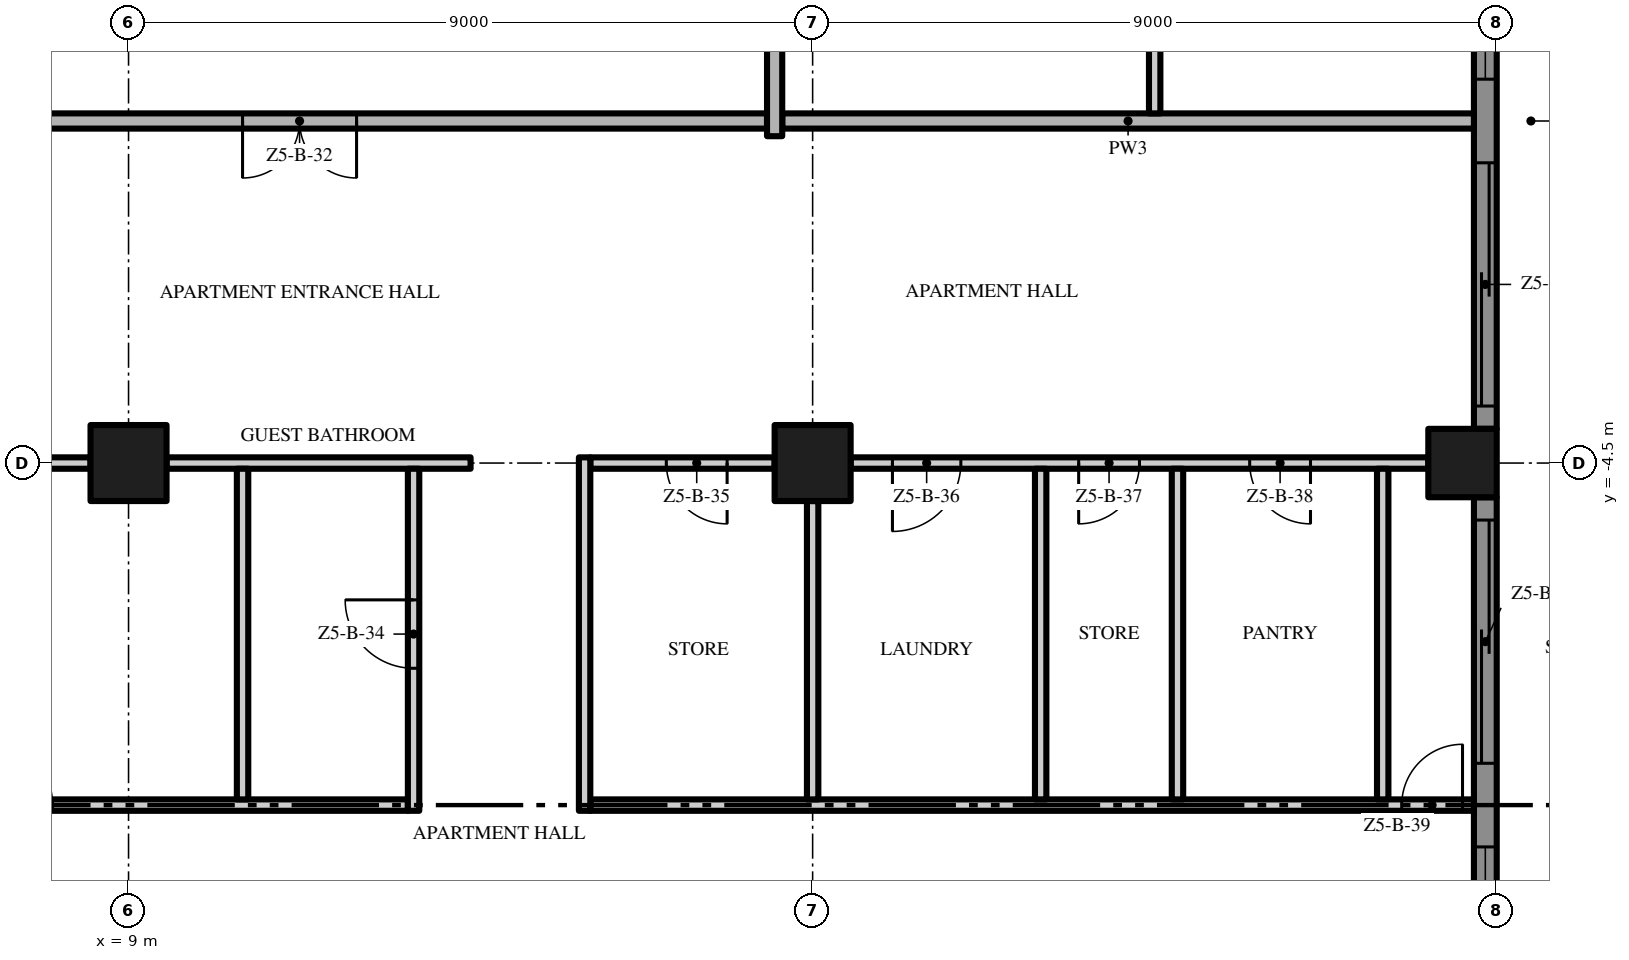
"""IFC4 building model, lengths in metres.
Left out: names, types, materials, properties, quantities, classifications, styles, units other than length and angle.
Written with IfcOpenShell. Run it as: python <this file> out.ifc"""

import sys

from ifc_helpers import new_model, si_unit, direction, frame, frame_2d, origin, origin_2d, place, context, subcontext, project, spatial, polyline, rectangle, outline, extrude, element, fill, save


model = new_model("IFC4")
c1 = context("Model", 3, precision=1e-05, world=origin(), true_north=direction((0.0, 1.0)))
c2 = subcontext(c1, "Body", "Model", "MODEL_VIEW")
j1 = project(units=[si_unit("LENGTHUNIT", "METRE"), si_unit("PLANEANGLEUNIT", "RADIAN")], contexts=[c1])
p1 = place(None, origin())
s1 = spatial("IfcSite", under=j1, at=p1, CompositionType="ELEMENT")
p2 = place(p1, origin())
s2 = spatial("IfcBuilding", under=s1, at=p2, CompositionType="ELEMENT")
p3 = place(p2, frame((0.0, 0.0, 254.0)))
s3 = spatial("IfcBuildingStorey", under=s2, at=p3, CompositionType="ELEMENT", Elevation=254.0)
p4 = place(p3, frame((18.0, -4.5, 0.0), z_axis=(0.0, 0.0, 1.0), x_axis=(1.0, 0.0, 0.0)))
e1 = element("IfcColumn", 1, at=p4, inside=s3, PredefinedType="COLUMN", context=c2, shape_type="SweptSolid", body=[
    extrude(rectangle(XDim=1.0, YDim=1.0, at=origin_2d()), origin(), (0.0, 0.0, 1.0), 3.5),
])
p5 = place(p3, frame((26.55, -4.5, 0.0), z_axis=(0.0, 0.0, 1.0), x_axis=(1.0, 0.0, 0.0)))
e2 = element("IfcColumn", 2, at=p5, inside=s3, PredefinedType="COLUMN", context=c2, shape_type="SweptSolid", body=[
    extrude(rectangle(XDim=0.9, YDim=0.9, at=origin_2d()), origin(), (0.0, 0.0, 1.0), 3.5),
])
p6 = place(p3, frame((9.0, -4.5, 0.0), z_axis=(0.0, 0.0, 1.0), x_axis=(1.0, 0.0, 0.0)))
e3 = element("IfcColumn", 3, at=p6, inside=s3, PredefinedType="COLUMN", context=c2, shape_type="SweptSolid", body=[
    extrude(rectangle(XDim=1.0, YDim=1.0, at=origin_2d()), origin(), (0.0, 0.0, 1.0), 3.5),
])
p7 = place(p3, frame((26.85, -4.95, 0.0), z_axis=(0.0, 0.0, 1.0), x_axis=(0.0, -1.0, 0.0)))
e4 = element("IfcWall", 4, at=p7, inside=s3, PredefinedType="SOLIDWALL", context=c2, shape_type="SweptSolid", body=[
    extrude(rectangle(XDim=8.1, YDim=0.3, at=frame_2d((4.05, 0.0))), origin(), (0.0, 0.0, 1.0), 3.5),
])
p8 = place(p7, frame((4.6, 0.0, 0.45)))
e5 = element("IfcOpeningElement", 5, at=p8, cuts=e4, PredefinedType="OPENING", context=c2, shape_type="SweptSolid", body=[
    extrude(rectangle(XDim=3.2, YDim=2.65, at=frame_2d((1.6, 1.325))), frame((0.0, 0.16, 0.0), z_axis=(0.0, -1.0, 0.0), x_axis=(1.0, 0.0, 0.0)), (0.0, 0.0, 1.0), 0.32),
])
p9 = place(p7, frame((0.3, 0.0, 0.0)))
e6 = element("IfcOpeningElement", 6, at=p9, cuts=e4, PredefinedType="OPENING", context=c2, shape_type="SweptSolid", body=[
    extrude(rectangle(XDim=3.2, YDim=2.4, at=frame_2d((1.6, 1.2))), frame((0.0, 0.16, 0.0), z_axis=(0.0, -1.0, 0.0), x_axis=(1.0, 0.0, 0.0)), (0.0, 0.0, 1.0), 0.32),
])
p10 = place(p3, frame((26.85, 4.05, 0.0), z_axis=(0.0, 0.0, 1.0), x_axis=(0.0, -1.0, 0.0)))
e7 = element("IfcWall", 7, at=p10, inside=s3, PredefinedType="SOLIDWALL", context=c2, shape_type="SweptSolid", body=[
    extrude(rectangle(XDim=8.1, YDim=0.3, at=frame_2d((4.05, 0.0))), origin(), (0.0, 0.0, 1.0), 3.5),
])
p11 = place(p10, frame((4.6, 0.0, 0.0)))
e8 = element("IfcOpeningElement", 8, at=p11, cuts=e7, PredefinedType="OPENING", context=c2, shape_type="SweptSolid", body=[
    extrude(rectangle(XDim=3.2, YDim=2.4, at=frame_2d((1.6, 1.2))), frame((0.0, 0.16, 0.0), z_axis=(0.0, -1.0, 0.0), x_axis=(1.0, 0.0, 0.0)), (0.0, 0.0, 1.0), 0.32),
])
p12 = place(p10, frame((0.3, 0.0, 0.45)))
e9 = element("IfcOpeningElement", 9, at=p12, cuts=e7, PredefinedType="OPENING", context=c2, shape_type="SweptSolid", body=[
    extrude(rectangle(XDim=3.2, YDim=2.65, at=frame_2d((1.6, 1.325))), frame((0.0, 0.16, 0.0), z_axis=(0.0, -1.0, 0.0), x_axis=(1.0, 0.0, 0.0)), (0.0, 0.0, 1.0), 0.32),
])
p13 = place(p3, origin())
e10 = element("IfcWall", 10, at=p13, inside=s3, PredefinedType="USERDEFINED", context=c2, shape_type="SweptSolid", body=[
    extrude(outline(polyline([(29.649, -18.0), (28.988, -16.5), (28.255, -15.0), (27.731, -13.5), (27.6, -12.375), (27.615, -12.0), (27.951, -10.5), (28.612, -9.0), (29.345, -7.5), (29.869, -6.0), (30.0, -4.875), (29.985, -4.5), (29.649, -3.0), (28.988, -1.5), (28.255, 0.0), (27.731, 1.5), (27.6, 2.625), (27.615, 3.0), (27.951, 4.5), (28.612, 6.0), (29.345, 7.5), (29.869, 9.0), (30.0, 10.125), (29.985, 10.5), (29.649, 12.0), (28.988, 13.5), (28.255, 15.0), (27.731, 16.5), (27.6, 17.625), (27.615, 18.0), (27.365, 18.01), (27.349, 17.615), (27.486, 16.444), (28.024, 14.904), (28.761, 13.395), (29.41, 11.921), (29.736, 10.467), (29.749, 10.135), (29.624, 9.056), (29.114, 7.596), (28.385, 6.105), (27.713, 4.579), (27.366, 3.033), (27.349, 2.615), (27.486, 1.444), (28.024, -0.096), (28.761, -1.605), (29.41, -3.079), (29.736, -4.533), (29.749, -4.865), (29.624, -5.944), (29.114, -7.404), (28.385, -8.895), (27.713, -10.421), (27.366, -11.967), (27.349, -12.385), (27.486, -13.556), (28.024, -15.096), (28.761, -16.605), (29.42, -18.101), (29.649, -18.0)])), origin(), (0.0, 0.0, 1.0), 0.9),
])
p14 = place(p3, frame((4.6, -9.0, 0.0), z_axis=(0.0, 0.0, 1.0), x_axis=(1.0, 0.0, 0.0)))
e11 = element("IfcWall", 11, at=p14, inside=s3, PredefinedType="PARTITIONING", context=c2, shape_type="SweptSolid", body=[
    extrude(rectangle(XDim=8.075, YDim=0.15, at=frame_2d((4.037, 0.0))), origin(), (0.0, 0.0, 1.0), 3.5),
])
p15 = place(p14, frame((2.4, 0.0, 0.0)))
e12 = element("IfcOpeningElement", 12, at=p15, cuts=e11, PredefinedType="OPENING", context=c2, shape_type="SweptSolid", body=[
    extrude(rectangle(XDim=1.0, YDim=2.4, at=frame_2d((0.5, 1.2))), frame((0.0, 0.085, 0.0), z_axis=(0.0, -1.0, 0.0), x_axis=(1.0, 0.0, 0.0)), (0.0, 0.0, 1.0), 0.17),
])
p16 = place(p3, frame((15.075, -9.0, 0.0), z_axis=(0.0, 0.0, 1.0), x_axis=(1.0, 0.0, 0.0)))
e13 = element("IfcWall", 13, at=p16, inside=s3, PredefinedType="PARTITIONING", context=c2, shape_type="SweptSolid", body=[
    extrude(rectangle(XDim=11.625, YDim=0.15, at=frame_2d((5.812, 0.0))), origin(), (0.0, 0.0, 1.0), 3.5),
])
p17 = place(p16, frame((10.675, 0.0, 0.0)))
e14 = element("IfcOpeningElement", 14, at=p17, cuts=e13, PredefinedType="OPENING", context=c2, shape_type="SweptSolid", body=[
    extrude(rectangle(XDim=0.8, YDim=2.0, at=frame_2d((0.4, 1.0))), frame((0.0, 0.085, 0.0), z_axis=(0.0, -1.0, 0.0), x_axis=(1.0, 0.0, 0.0)), (0.0, 0.0, 1.0), 0.17),
])
p18 = place(p3, frame((4.6, -4.5, 0.0), z_axis=(0.0, 0.0, 1.0), x_axis=(1.0, 0.0, 0.0)))
e15 = element("IfcWall", 15, at=p18, inside=s3, PredefinedType="PARTITIONING", context=c2, shape_type="SweptSolid", body=[
    extrude(rectangle(XDim=3.9, YDim=0.15, at=frame_2d((1.95, 0.0))), origin(), (0.0, 0.0, 1.0), 3.5),
])
p19 = place(p3, frame((9.5, -4.5, 0.0), z_axis=(0.0, 0.0, 1.0), x_axis=(1.0, 0.0, 0.0)))
e16 = element("IfcWall", 16, at=p19, inside=s3, PredefinedType="PARTITIONING", context=c2, shape_type="SweptSolid", body=[
    extrude(rectangle(XDim=4.0, YDim=0.15, at=frame_2d((2.0, 0.0))), origin(), (0.0, 0.0, 1.0), 3.5),
])
p20 = place(p3, frame((17.5, -4.5, 0.0), z_axis=(0.0, 0.0, 1.0), x_axis=(-1.0, 0.0, 0.0)))
e17 = element("IfcWall", 17, at=p20, inside=s3, PredefinedType="PARTITIONING", context=c2, shape_type="SweptSolid", body=[
    extrude(rectangle(XDim=2.425, YDim=0.15, at=frame_2d((1.212, 0.0))), origin(), (0.0, 0.0, 1.0), 3.5),
])
p21 = place(p20, frame((0.625, 0.0, 0.0)))
e18 = element("IfcOpeningElement", 18, at=p21, cuts=e17, PredefinedType="OPENING", context=c2, shape_type="SweptSolid", body=[
    extrude(rectangle(XDim=0.8, YDim=2.0, at=frame_2d((0.4, 1.0))), frame((0.0, 0.085, 0.0), z_axis=(0.0, -1.0, 0.0), x_axis=(1.0, 0.0, 0.0)), (0.0, 0.0, 1.0), 0.17),
])
p22 = place(p3, frame((26.1, -4.5, 0.0), z_axis=(0.0, 0.0, 1.0), x_axis=(-1.0, 0.0, 0.0)))
e19 = element("IfcWall", 19, at=p22, inside=s3, PredefinedType="PARTITIONING", context=c2, shape_type="SweptSolid", body=[
    extrude(rectangle(XDim=7.6, YDim=0.15, at=frame_2d((3.8, 0.0))), origin(), (0.0, 0.0, 1.0), 3.5),
])
p23 = place(p22, frame((6.15, 0.0, 0.0)))
e20 = element("IfcOpeningElement", 20, at=p23, cuts=e19, PredefinedType="OPENING", context=c2, shape_type="SweptSolid", body=[
    extrude(rectangle(XDim=0.9, YDim=2.1, at=frame_2d((0.45, 1.05))), frame((0.0, 0.085, 0.0), z_axis=(0.0, -1.0, 0.0), x_axis=(1.0, 0.0, 0.0)), (0.0, 0.0, 1.0), 0.17),
])
p24 = place(p22, frame((3.8, 0.0, 0.0)))
e21 = element("IfcOpeningElement", 21, at=p24, cuts=e19, PredefinedType="OPENING", context=c2, shape_type="SweptSolid", body=[
    extrude(rectangle(XDim=0.8, YDim=2.0, at=frame_2d((0.4, 1.0))), frame((0.0, 0.085, 0.0), z_axis=(0.0, -1.0, 0.0), x_axis=(1.0, 0.0, 0.0)), (0.0, 0.0, 1.0), 0.17),
])
p25 = place(p22, frame((1.55, 0.0, 0.0)))
e22 = element("IfcOpeningElement", 22, at=p25, cuts=e19, PredefinedType="OPENING", context=c2, shape_type="SweptSolid", body=[
    extrude(rectangle(XDim=0.8, YDim=2.0, at=frame_2d((0.4, 1.0))), frame((0.0, 0.085, 0.0), z_axis=(0.0, -1.0, 0.0), x_axis=(1.0, 0.0, 0.0)), (0.0, 0.0, 1.0), 0.17),
])
p26 = place(p3, frame((17.4, 0.0, 0.0), z_axis=(0.0, 0.0, 1.0), x_axis=(-1.0, 0.0, 0.0)))
e23 = element("IfcWall", 23, at=p26, inside=s3, PredefinedType="PARTITIONING", context=c2, shape_type="SweptSolid", body=[
    extrude(rectangle(XDim=34.8, YDim=0.2, at=frame_2d((17.4, 0.0))), origin(), (0.0, 0.0, 1.0), 3.5),
])
p27 = place(p26, frame((23.4, 0.0, 0.0)))
e24 = element("IfcOpeningElement", 24, at=p27, cuts=e23, PredefinedType="OPENING", context=c2, shape_type="SweptSolid", body=[
    extrude(rectangle(XDim=1.5, YDim=2.4, at=frame_2d((0.75, 1.2))), frame((0.0, 0.11, 0.0), z_axis=(0.0, -1.0, 0.0), x_axis=(1.0, 0.0, 0.0)), (0.0, 0.0, 1.0), 0.22),
])
p28 = place(p26, frame((5.4, 0.0, 0.0)))
e25 = element("IfcOpeningElement", 25, at=p28, cuts=e23, PredefinedType="OPENING", context=c2, shape_type="SweptSolid", body=[
    extrude(rectangle(XDim=1.5, YDim=2.4, at=frame_2d((0.75, 1.2))), frame((0.0, 0.11, 0.0), z_axis=(0.0, -1.0, 0.0), x_axis=(1.0, 0.0, 0.0)), (0.0, 0.0, 1.0), 0.22),
])
p29 = place(p3, frame((17.6, 0.0, 0.0), z_axis=(0.0, 0.0, 1.0), x_axis=(1.0, 0.0, 0.0)))
e26 = element("IfcWall", 26, at=p29, inside=s3, PredefinedType="PARTITIONING", context=c2, shape_type="SweptSolid", body=[
    extrude(rectangle(XDim=9.1, YDim=0.2, at=frame_2d((4.55, 0.0))), origin(), (0.0, 0.0, 1.0), 3.5),
])
p30 = place(p3, frame((10.5, -8.925, 0.0), z_axis=(0.0, 0.0, 1.0), x_axis=(0.0, 1.0, 0.0)))
e27 = element("IfcWall", 27, at=p30, inside=s3, PredefinedType="PARTITIONING", context=c2, shape_type="SweptSolid", body=[
    extrude(rectangle(XDim=4.35, YDim=0.15, at=frame_2d((2.175, 0.0))), origin(), (0.0, 0.0, 1.0), 3.5),
])
p31 = place(p3, frame((12.75, -9.075, 0.0), z_axis=(0.0, 0.0, 1.0), x_axis=(0.0, 1.0, 0.0)))
e28 = element("IfcWall", 28, at=p31, inside=s3, PredefinedType="PARTITIONING", context=c2, shape_type="SweptSolid", body=[
    extrude(rectangle(XDim=4.5, YDim=0.15, at=frame_2d((2.25, 0.0))), origin(), (0.0, 0.0, 1.0), 3.5),
])
p32 = place(p31, frame((1.875, 0.0, 0.0)))
e29 = element("IfcOpeningElement", 29, at=p32, cuts=e28, PredefinedType="OPENING", context=c2, shape_type="SweptSolid", body=[
    extrude(rectangle(XDim=0.9, YDim=2.1, at=frame_2d((0.45, 1.05))), frame((0.0, 0.085, 0.0), z_axis=(0.0, -1.0, 0.0), x_axis=(1.0, 0.0, 0.0)), (0.0, 0.0, 1.0), 0.17),
])
p33 = place(p3, frame((15.0, -9.075, 0.0), z_axis=(0.0, 0.0, 1.0), x_axis=(0.0, 1.0, 0.0)))
e30 = element("IfcWall", 30, at=p33, inside=s3, PredefinedType="PARTITIONING", context=c2, shape_type="SweptSolid", body=[
    extrude(rectangle(XDim=4.65, YDim=0.15, at=frame_2d((2.325, 0.0))), origin(), (0.0, 0.0, 1.0), 3.5),
])
p34 = place(p3, frame((17.5, -0.2, 0.0), z_axis=(0.0, 0.0, 1.0), x_axis=(0.0, 1.0, 0.0)))
e31 = element("IfcWall", 31, at=p34, inside=s3, PredefinedType="PARTITIONING", context=c2, shape_type="SweptSolid", body=[
    extrude(rectangle(XDim=4.2, YDim=0.2, at=frame_2d((2.1, 0.0))), origin(), (0.0, 0.0, 1.0), 3.5),
])
p35 = place(p3, frame((18.0, -8.925, 0.0), z_axis=(0.0, 0.0, 1.0), x_axis=(0.0, 1.0, 0.0)))
e32 = element("IfcWall", 32, at=p35, inside=s3, PredefinedType="PARTITIONING", context=c2, shape_type="SweptSolid", body=[
    extrude(rectangle(XDim=3.925, YDim=0.15, at=frame_2d((1.962, 0.0))), origin(), (0.0, 0.0, 1.0), 3.5),
])
p36 = place(p3, frame((21.0, -8.925, 0.0), z_axis=(0.0, 0.0, 1.0), x_axis=(0.0, 1.0, 0.0)))
e33 = element("IfcWall", 33, at=p36, inside=s3, PredefinedType="PARTITIONING", context=c2, shape_type="SweptSolid", body=[
    extrude(rectangle(XDim=4.35, YDim=0.15, at=frame_2d((2.175, 0.0))), origin(), (0.0, 0.0, 1.0), 3.5),
])
p37 = place(p3, frame((22.5, 17.55, 0.0), z_axis=(0.0, 0.0, 1.0), x_axis=(0.0, -1.0, 0.0)))
e34 = element("IfcWall", 34, at=p37, inside=s3, PredefinedType="PARTITIONING", context=c2, shape_type="SweptSolid", body=[
    extrude(rectangle(XDim=17.45, YDim=0.15, at=frame_2d((8.725, 0.0))), origin(), (0.0, 0.0, 1.0), 3.5),
])
p38 = place(p37, frame((14.8, 0.0, 0.0)))
e35 = element("IfcOpeningElement", 35, at=p38, cuts=e34, PredefinedType="OPENING", context=c2, shape_type="SweptSolid", body=[
    extrude(rectangle(XDim=1.0, YDim=2.4, at=frame_2d((0.5, 1.2))), frame((0.0, 0.085, 0.0), z_axis=(0.0, -1.0, 0.0), x_axis=(1.0, 0.0, 0.0)), (0.0, 0.0, 1.0), 0.17),
])
p39 = place(p37, frame((7.65, 0.0, 0.0)))
e36 = element("IfcOpeningElement", 36, at=p39, cuts=e34, PredefinedType="OPENING", context=c2, shape_type="SweptSolid", body=[
    extrude(rectangle(XDim=1.8, YDim=2.4, at=frame_2d((0.9, 1.2))), frame((0.0, 0.085, 0.0), z_axis=(0.0, -1.0, 0.0), x_axis=(1.0, 0.0, 0.0)), (0.0, 0.0, 1.0), 0.17),
])
for number, where, z_axis, x_axis in (
    (37, (22.8, -8.925, 0.0), (0.0, 0.0, 1.0), (0.0, 1.0, 0.0)),
    (38, (25.5, -8.925, 0.0), (0.0, 0.0, 1.0), (0.0, 1.0, 0.0)),
):
    element("IfcWall", number, at=place(p3, frame(where, z_axis=z_axis, x_axis=x_axis)), inside=s3, PredefinedType="PARTITIONING", context=c2, shape_type="SweptSolid", body=[
        extrude(rectangle(XDim=4.35, YDim=0.15, at=frame_2d((2.175, 0.0))), origin(), (0.0, 0.0, 1.0), 3.5),
    ])
p40 = place(p8, origin())
e39 = element("IfcWindow", 39, at=p40, inside=s3, PartitioningType="SINGLE_PANEL", PredefinedType="WINDOW", context=c2, shape_type="SweptSolid", body=[
    extrude(rectangle(XDim=3.2, YDim=2.65, at=frame_2d((1.6, 1.325))), frame((0.0, 0.03, 0.0), z_axis=(0.0, -1.0, 0.0), x_axis=(1.0, 0.0, 0.0)), (0.0, 0.0, 1.0), 0.06),
])
fill(e5, e39)
p41 = place(p9, origin())
e40 = element("IfcDoor", 40, at=p41, inside=s3, OperationType="SINGLE_SWING_LEFT", PredefinedType="DOOR", context=c2, shape_type="SweptSolid", body=[
    extrude(rectangle(XDim=3.2, YDim=2.4, at=frame_2d((1.6, 1.2))), frame((0.0, 0.025, 0.0), z_axis=(0.0, -1.0, 0.0), x_axis=(1.0, 0.0, 0.0)), (0.0, 0.0, 1.0), 0.05),
])
fill(e6, e40)
p42 = place(p11, origin())
e41 = element("IfcDoor", 41, at=p42, inside=s3, OperationType="SINGLE_SWING_LEFT", PredefinedType="DOOR", context=c2, shape_type="SweptSolid", body=[
    extrude(rectangle(XDim=3.2, YDim=2.4, at=frame_2d((1.6, 1.2))), frame((0.0, 0.025, 0.0), z_axis=(0.0, -1.0, 0.0), x_axis=(1.0, 0.0, 0.0)), (0.0, 0.0, 1.0), 0.05),
])
fill(e8, e41)
p43 = place(p12, origin())
e42 = element("IfcWindow", 42, at=p43, inside=s3, PartitioningType="SINGLE_PANEL", PredefinedType="WINDOW", context=c2, shape_type="SweptSolid", body=[
    extrude(rectangle(XDim=3.2, YDim=2.65, at=frame_2d((1.6, 1.325))), frame((0.0, 0.03, 0.0), z_axis=(0.0, -1.0, 0.0), x_axis=(1.0, 0.0, 0.0)), (0.0, 0.0, 1.0), 0.06),
])
fill(e9, e42)
p44 = place(p28, origin())
e43 = element("IfcDoor", 43, at=p44, inside=s3, OperationType="DOUBLE_DOOR_SINGLE_SWING", PredefinedType="DOOR", context=c2, shape_type="SweptSolid", body=[
    extrude(rectangle(XDim=1.5, YDim=2.4, at=frame_2d((0.75, 1.2))), frame((0.0, 0.025, 0.0), z_axis=(0.0, -1.0, 0.0), x_axis=(1.0, 0.0, 0.0)), (0.0, 0.0, 1.0), 0.05),
])
fill(e25, e43)
p45 = place(p32, origin())
e44 = element("IfcDoor", 44, at=p45, inside=s3, OperationType="SINGLE_SWING_RIGHT", PredefinedType="DOOR", context=c2, shape_type="SweptSolid", body=[
    extrude(rectangle(XDim=0.9, YDim=2.1, at=frame_2d((0.45, 1.05))), frame((0.0, 0.025, 0.0), z_axis=(0.0, -1.0, 0.0), x_axis=(1.0, 0.0, 0.0)), (0.0, 0.0, 1.0), 0.05),
])
fill(e29, e44)
p46 = place(p21, origin())
e45 = element("IfcDoor", 45, at=p46, inside=s3, OperationType="SINGLE_SWING_LEFT", PredefinedType="DOOR", context=c2, shape_type="SweptSolid", body=[
    extrude(rectangle(XDim=0.8, YDim=2.0, at=frame_2d((0.4, 1.0))), frame((0.0, 0.025, 0.0), z_axis=(0.0, -1.0, 0.0), x_axis=(1.0, 0.0, 0.0)), (0.0, 0.0, 1.0), 0.05),
])
fill(e18, e45)
p47 = place(p23, origin())
e46 = element("IfcDoor", 46, at=p47, inside=s3, OperationType="SINGLE_SWING_RIGHT", PredefinedType="DOOR", context=c2, shape_type="SweptSolid", body=[
    extrude(rectangle(XDim=0.9, YDim=2.1, at=frame_2d((0.45, 1.05))), frame((0.0, 0.025, 0.0), z_axis=(0.0, -1.0, 0.0), x_axis=(1.0, 0.0, 0.0)), (0.0, 0.0, 1.0), 0.05),
])
fill(e20, e46)
p48 = place(p24, origin())
e47 = element("IfcDoor", 47, at=p48, inside=s3, OperationType="SINGLE_SWING_RIGHT", PredefinedType="DOOR", context=c2, shape_type="SweptSolid", body=[
    extrude(rectangle(XDim=0.8, YDim=2.0, at=frame_2d((0.4, 1.0))), frame((0.0, 0.025, 0.0), z_axis=(0.0, -1.0, 0.0), x_axis=(1.0, 0.0, 0.0)), (0.0, 0.0, 1.0), 0.05),
])
fill(e21, e47)
p49 = place(p25, origin())
e48 = element("IfcDoor", 48, at=p49, inside=s3, OperationType="SINGLE_SWING_LEFT", PredefinedType="DOOR", context=c2, shape_type="SweptSolid", body=[
    extrude(rectangle(XDim=0.8, YDim=2.0, at=frame_2d((0.4, 1.0))), frame((0.0, 0.025, 0.0), z_axis=(0.0, -1.0, 0.0), x_axis=(1.0, 0.0, 0.0)), (0.0, 0.0, 1.0), 0.05),
])
fill(e22, e48)
p50 = place(p17, origin())
e49 = element("IfcDoor", 49, at=p50, inside=s3, OperationType="SINGLE_SWING_RIGHT", PredefinedType="DOOR", context=c2, shape_type="SweptSolid", body=[
    extrude(rectangle(XDim=0.8, YDim=2.0, at=frame_2d((0.4, 1.0))), frame((0.0, 0.025, 0.0), z_axis=(0.0, -1.0, 0.0), x_axis=(1.0, 0.0, 0.0)), (0.0, 0.0, 1.0), 0.05),
])
fill(e14, e49)
save(model, sys.argv[1])
